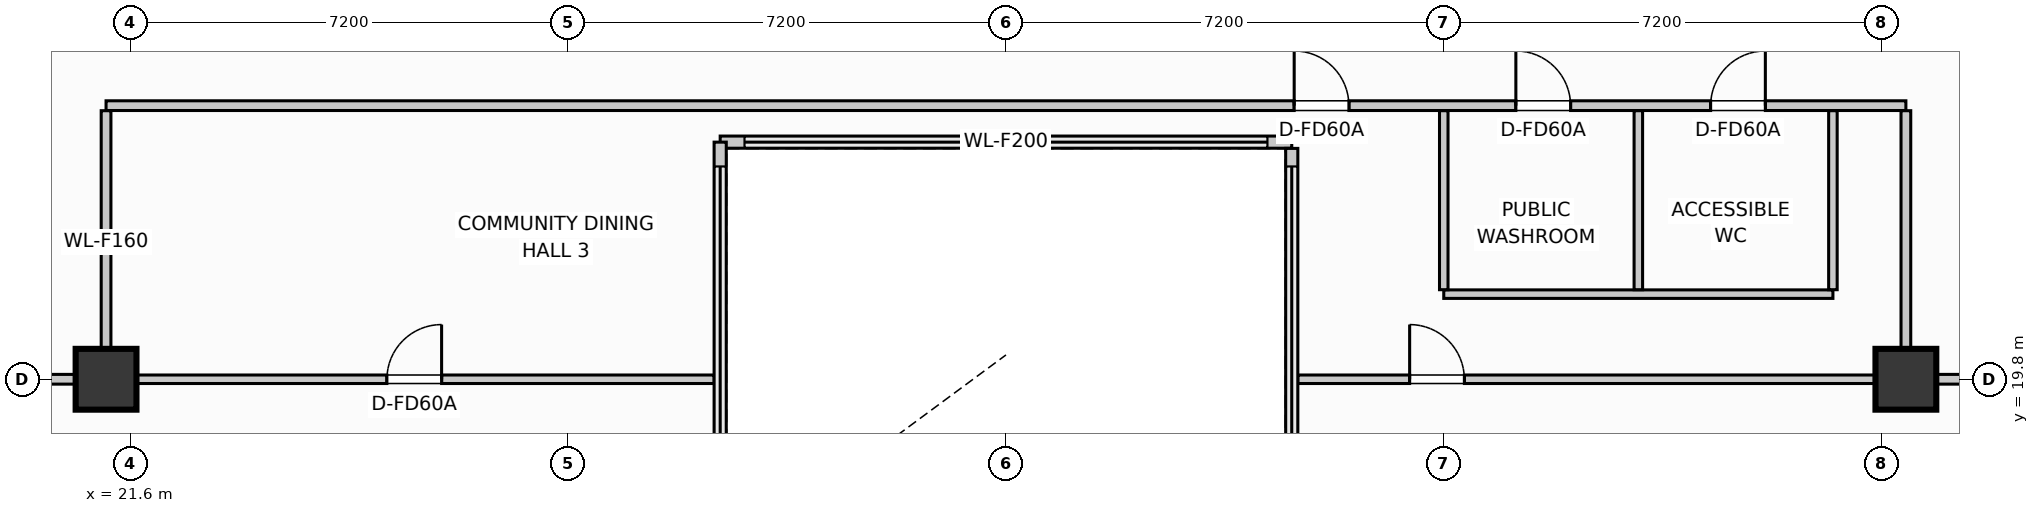
"""IFC4 building model, lengths in metres.
Left out: names, types, materials, properties, quantities, classifications, styles, units other than length and angle.
Written with IfcOpenShell. Run it as: python <this file> out.ifc"""

import sys

from ifc_helpers import new_model, si_unit, direction, frame, frame_2d, origin, origin_2d, place, context, subcontext, project, spatial, rectangle, extrude, element, fill, save


model = new_model("IFC4")
c1 = context("Model", 3, precision=1e-05, world=origin(), true_north=direction((0.0, 1.0)))
c2 = subcontext(c1, "Body", "Model", "MODEL_VIEW")
j1 = project(units=[si_unit("LENGTHUNIT", "METRE"), si_unit("PLANEANGLEUNIT", "RADIAN")], contexts=[c1])
p1 = place(None, origin())
s1 = spatial("IfcSite", under=j1, at=p1, CompositionType="ELEMENT")
p2 = place(p1, origin())
s2 = spatial("IfcBuilding", under=s1, at=p2, CompositionType="ELEMENT")
p3 = place(p2, frame((0.0, 0.0, 200.35)))
s3 = spatial("IfcBuildingStorey", under=s2, at=p3, CompositionType="ELEMENT", Elevation=200.35)
for number, where, z_axis, x_axis in (
    (1, (50.8, 19.8, 0.0), (0.0, 0.0, 1.0), (1.0, 0.0, 0.0)),
    (2, (21.2, 19.8, 0.0), (0.0, 0.0, 1.0), (1.0, 0.0, 0.0)),
):
    element("IfcColumn", number, at=place(p3, frame(where, z_axis=z_axis, x_axis=x_axis)), inside=s3, PredefinedType="COLUMN", context=c2, shape_type="SweptSolid", body=[
        extrude(rectangle(XDim=1.0, YDim=1.0, at=origin_2d()), origin(), (0.0, 0.0, 1.0), 4.5),
    ])
p4 = place(p3, frame((31.3, 23.7, 0.0), z_axis=(0.0, 0.0, 1.0), x_axis=(1.0, 0.0, 0.0)))
e3 = element("IfcWall", 3, at=p4, inside=s3, PredefinedType="PARTITIONING", context=c2, shape_type="SweptSolid", body=[
    extrude(rectangle(XDim=9.4, YDim=0.2, at=frame_2d((4.7, 0.0))), origin(), (0.0, 0.0, 1.0), 4.245),
])
p5 = place(p3, frame((31.3, 16.7, 0.0), z_axis=(0.0, 0.0, 1.0), x_axis=(0.0, 1.0, 0.0)))
e4 = element("IfcWall", 4, at=p5, inside=s3, PredefinedType="PARTITIONING", context=c2, shape_type="SweptSolid", body=[
    extrude(rectangle(XDim=7.0, YDim=0.2, at=frame_2d((3.5, 0.0))), origin(), (0.0, 0.0, 1.0), 4.245),
])
p6 = place(p3, frame((40.7, 23.597, 0.0), z_axis=(0.0, 0.0, 1.0), x_axis=(0.0, -1.0, 0.0)))
e5 = element("IfcWall", 5, at=p6, inside=s3, PredefinedType="PARTITIONING", context=c2, shape_type="SweptSolid", body=[
    extrude(rectangle(XDim=6.794, YDim=0.2, at=frame_2d((3.397, 0.0))), origin(), (0.0, 0.0, 1.0), 4.245),
])
p7 = place(p3, frame((21.2, 24.3, 0.0), z_axis=(0.0, 0.0, 1.0), x_axis=(1.0, 0.0, 0.0)))
e6 = element("IfcWall", 6, at=p7, inside=s3, PredefinedType="PARTITIONING", context=c2, shape_type="SweptSolid", body=[
    extrude(rectangle(XDim=29.6, YDim=0.16, at=frame_2d((14.8, 0.0))), origin(), (0.0, 0.0, 1.0), 4.245),
])
p8 = place(p7, frame((19.54, 0.0, 0.0)))
e7 = element("IfcOpeningElement", 7, at=p8, cuts=e6, PredefinedType="OPENING", context=c2, shape_type="SweptSolid", body=[
    extrude(rectangle(XDim=0.9, YDim=2.0, at=frame_2d((0.45, 1.0))), frame((0.0, 0.09, 0.0), z_axis=(0.0, -1.0, 0.0), x_axis=(1.0, 0.0, 0.0)), (0.0, 0.0, 1.0), 0.18),
])
p9 = place(p7, frame((26.389, 0.0, 0.0)))
e8 = element("IfcOpeningElement", 8, at=p9, cuts=e6, PredefinedType="OPENING", context=c2, shape_type="SweptSolid", body=[
    extrude(rectangle(XDim=0.9, YDim=2.0, at=frame_2d((0.45, 1.0))), frame((0.0, 0.09, 0.0), z_axis=(0.0, -1.0, 0.0), x_axis=(1.0, 0.0, 0.0)), (0.0, 0.0, 1.0), 0.18),
])
p10 = place(p7, frame((23.186, 0.0, 0.0)))
e9 = element("IfcOpeningElement", 9, at=p10, cuts=e6, PredefinedType="OPENING", context=c2, shape_type="SweptSolid", body=[
    extrude(rectangle(XDim=0.9, YDim=2.0, at=frame_2d((0.45, 1.0))), frame((0.0, 0.09, 0.0), z_axis=(0.0, -1.0, 0.0), x_axis=(1.0, 0.0, 0.0)), (0.0, 0.0, 1.0), 0.18),
])
p11 = place(p3, frame((43.2, 21.2, 0.0), z_axis=(0.0, 0.0, 1.0), x_axis=(1.0, 0.0, 0.0)))
e10 = element("IfcWall", 10, at=p11, inside=s3, PredefinedType="PARTITIONING", context=c2, shape_type="SweptSolid", body=[
    extrude(rectangle(XDim=6.4, YDim=0.14, at=frame_2d((3.2, 0.0))), origin(), (0.0, 0.0, 1.0), 4.245),
])
for number, where, z_axis, x_axis in (
    (11, (46.4, 21.273, 0.0), (0.0, 0.0, 1.0), (0.0, 1.0, 0.0)),
    (12, (43.2, 21.273, 0.0), (0.0, 0.0, 1.0), (0.0, 1.0, 0.0)),
    (13, (49.6, 21.273, 0.0), (0.0, 0.0, 1.0), (0.0, 1.0, 0.0)),
):
    element("IfcWall", number, at=place(p3, frame(where, z_axis=z_axis, x_axis=x_axis)), inside=s3, PredefinedType="PARTITIONING", context=c2, shape_type="SweptSolid", body=[
        extrude(rectangle(XDim=2.944, YDim=0.14, at=frame_2d((1.472, 0.0))), origin(), (0.0, 0.0, 1.0), 4.245),
    ])
p12 = place(p3, frame((18.883, 19.8, 0.0), z_axis=(0.0, 0.0, 1.0), x_axis=(1.0, 0.0, 0.0)))
e14 = element("IfcWall", 14, at=p12, inside=s3, PredefinedType="PARTITIONING", context=c2, shape_type="SweptSolid", body=[
    extrude(rectangle(XDim=2.437, YDim=0.16, at=frame_2d((1.219, 0.0))), origin(), (0.0, 0.0, 1.0), 3.822),
])
p13 = place(p3, frame((21.2, 19.883, 0.0), z_axis=(0.0, 0.0, 1.0), x_axis=(0.0, 1.0, 0.0)))
e15 = element("IfcWall", 15, at=p13, inside=s3, PredefinedType="PARTITIONING", context=c2, shape_type="SweptSolid", body=[
    extrude(rectangle(XDim=4.334, YDim=0.16, at=frame_2d((2.167, 0.0))), origin(), (0.0, 0.0, 1.0), 4.245),
])
p14 = place(p3, frame((50.68, 19.8, 0.0), z_axis=(0.0, 0.0, 1.0), x_axis=(1.0, 0.0, 0.0)))
e16 = element("IfcWall", 16, at=p14, inside=s3, PredefinedType="PARTITIONING", context=c2, shape_type="SweptSolid", body=[
    extrude(rectangle(XDim=2.437, YDim=0.16, at=frame_2d((1.219, 0.0))), origin(), (0.0, 0.0, 1.0), 3.822),
])
p15 = place(p3, frame((50.8, 19.883, 0.0), z_axis=(0.0, 0.0, 1.0), x_axis=(0.0, 1.0, 0.0)))
e17 = element("IfcWall", 17, at=p15, inside=s3, PredefinedType="PARTITIONING", context=c2, shape_type="SweptSolid", body=[
    extrude(rectangle(XDim=4.334, YDim=0.16, at=frame_2d((2.167, 0.0))), origin(), (0.0, 0.0, 1.0), 4.245),
])
p16 = place(p3, frame((21.32, 19.8, 0.0), z_axis=(0.0, 0.0, 1.0), x_axis=(1.0, 0.0, 0.0)))
e18 = element("IfcWall", 18, at=p16, inside=s3, PredefinedType="PARTITIONING", context=c2, shape_type="SweptSolid", body=[
    extrude(rectangle(XDim=9.877, YDim=0.14, at=frame_2d((4.938, 0.0))), origin(), (0.0, 0.0, 1.0), 4.245),
])
p17 = place(p16, frame((4.499, 0.0, 0.0)))
e19 = element("IfcOpeningElement", 19, at=p17, cuts=e18, PredefinedType="OPENING", context=c2, shape_type="SweptSolid", body=[
    extrude(rectangle(XDim=0.9, YDim=2.0, at=frame_2d((0.45, 1.0))), frame((0.0, 0.08, 0.0), z_axis=(0.0, -1.0, 0.0), x_axis=(1.0, 0.0, 0.0)), (0.0, 0.0, 1.0), 0.16),
])
p18 = place(p3, frame((40.803, 19.8, 0.0), z_axis=(0.0, 0.0, 1.0), x_axis=(1.0, 0.0, 0.0)))
e20 = element("IfcWall", 20, at=p18, inside=s3, PredefinedType="PARTITIONING", context=c2, shape_type="SweptSolid", body=[
    extrude(rectangle(XDim=9.877, YDim=0.14, at=frame_2d((4.938, 0.0))), origin(), (0.0, 0.0, 1.0), 4.245),
])
p19 = place(p18, frame((1.836, 0.0, 0.0)))
e21 = element("IfcOpeningElement", 21, at=p19, cuts=e20, PredefinedType="OPENING", context=c2, shape_type="SweptSolid", body=[
    extrude(rectangle(XDim=0.9, YDim=2.0, at=frame_2d((0.45, 1.0))), frame((0.0, 0.08, 0.0), z_axis=(0.0, -1.0, 0.0), x_axis=(1.0, 0.0, 0.0)), (0.0, 0.0, 1.0), 0.16),
])
p20 = place(p8, origin())
e22 = element("IfcDoor", 22, at=p20, inside=s3, OperationType="SINGLE_SWING_LEFT", PredefinedType="DOOR", context=c2, shape_type="SweptSolid", body=[
    extrude(rectangle(XDim=0.9, YDim=2.0, at=frame_2d((0.45, 1.0))), frame((0.0, 0.025, 0.0), z_axis=(0.0, -1.0, 0.0), x_axis=(1.0, 0.0, 0.0)), (0.0, 0.0, 1.0), 0.05),
])
fill(e7, e22)
p21 = place(p9, origin())
e23 = element("IfcDoor", 23, at=p21, inside=s3, OperationType="SINGLE_SWING_RIGHT", PredefinedType="DOOR", context=c2, shape_type="SweptSolid", body=[
    extrude(rectangle(XDim=0.9, YDim=2.0, at=frame_2d((0.45, 1.0))), frame((0.0, 0.025, 0.0), z_axis=(0.0, -1.0, 0.0), x_axis=(1.0, 0.0, 0.0)), (0.0, 0.0, 1.0), 0.05),
])
fill(e8, e23)
p22 = place(p10, origin())
e24 = element("IfcDoor", 24, at=p22, inside=s3, OperationType="SINGLE_SWING_LEFT", PredefinedType="DOOR", context=c2, shape_type="SweptSolid", body=[
    extrude(rectangle(XDim=0.9, YDim=2.0, at=frame_2d((0.45, 1.0))), frame((0.0, 0.025, 0.0), z_axis=(0.0, -1.0, 0.0), x_axis=(1.0, 0.0, 0.0)), (0.0, 0.0, 1.0), 0.05),
])
fill(e9, e24)
p23 = place(p17, origin())
e25 = element("IfcDoor", 25, at=p23, inside=s3, OperationType="SINGLE_SWING_RIGHT", PredefinedType="DOOR", context=c2, shape_type="SweptSolid", body=[
    extrude(rectangle(XDim=0.9, YDim=2.0, at=frame_2d((0.45, 1.0))), frame((0.0, 0.025, 0.0), z_axis=(0.0, -1.0, 0.0), x_axis=(1.0, 0.0, 0.0)), (0.0, 0.0, 1.0), 0.05),
])
fill(e19, e25)
p24 = place(p19, origin())
e26 = element("IfcDoor", 26, at=p24, inside=s3, OperationType="SINGLE_SWING_LEFT", PredefinedType="DOOR", context=c2, shape_type="SweptSolid", body=[
    extrude(rectangle(XDim=0.9, YDim=2.0, at=frame_2d((0.45, 1.0))), frame((0.0, 0.025, 0.0), z_axis=(0.0, -1.0, 0.0), x_axis=(1.0, 0.0, 0.0)), (0.0, 0.0, 1.0), 0.05),
])
fill(e21, e26)
save(model, sys.argv[1])
